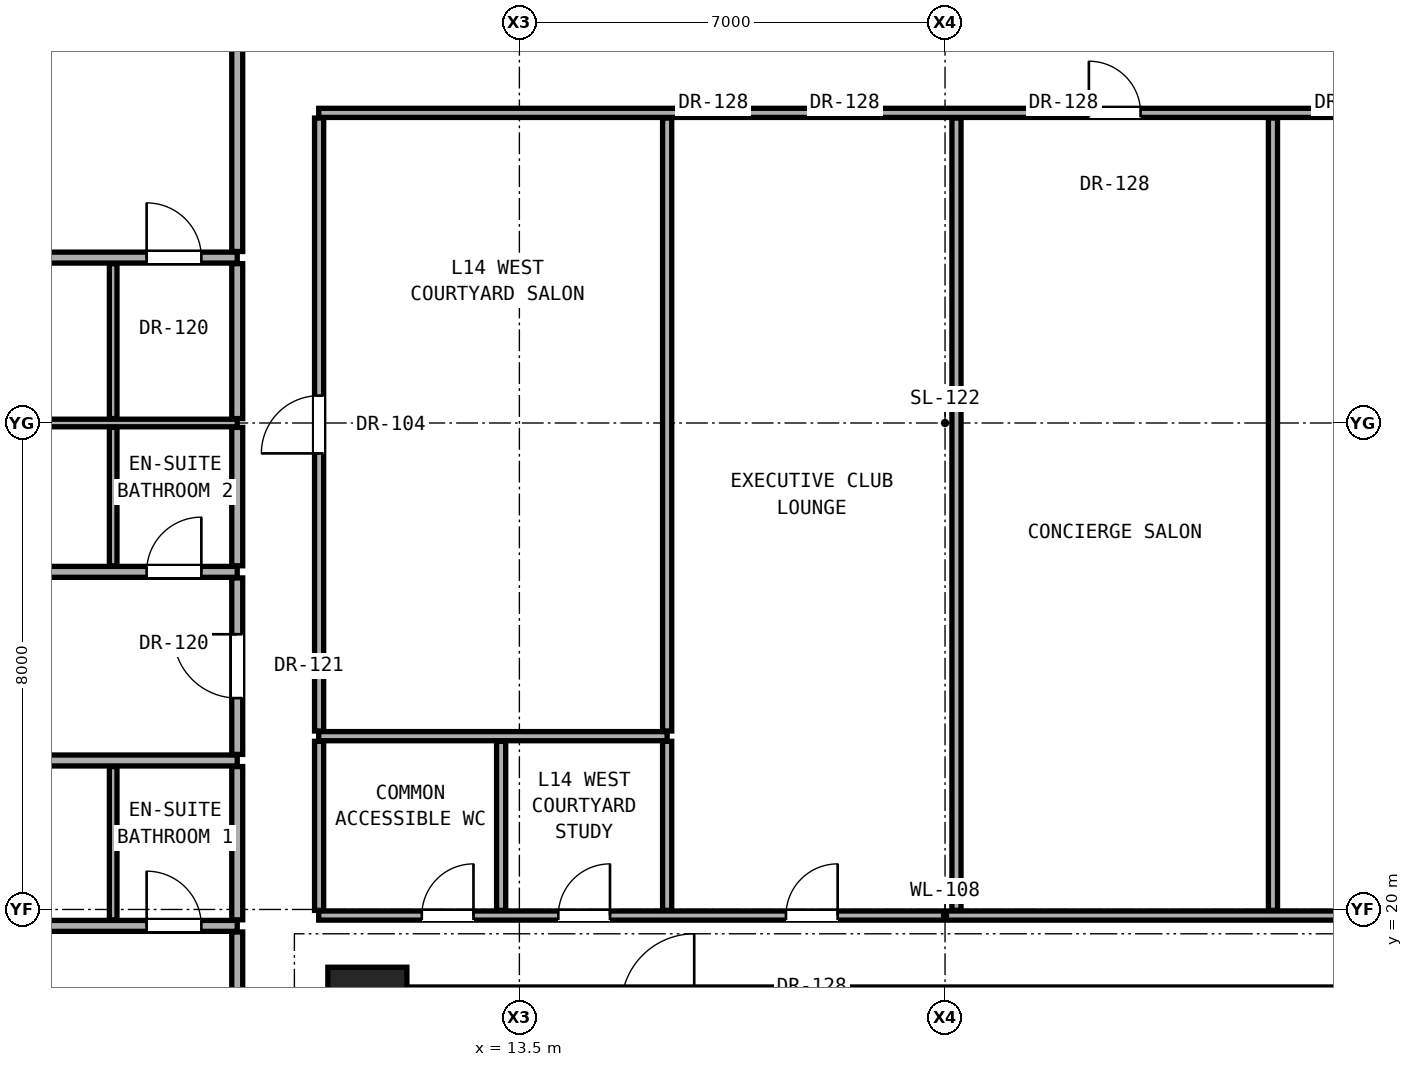
"""IFC4 building model, lengths in metres.
Left out: names, types, materials, properties, quantities, classifications, styles, units other than length and angle.
Written with IfcOpenShell. Run it as: python <this file> out.ifc"""

import sys

from ifc_helpers import new_model, si_unit, direction, frame, frame_2d, origin, origin_2d, place, context, subcontext, project, spatial, rectangle, extrude, element, fill, save


model = new_model("IFC4")
c1 = context("Model", 3, precision=1e-05, world=origin(), true_north=direction((0.0, 1.0)))
c2 = subcontext(c1, "Body", "Model", "MODEL_VIEW")
j1 = project(units=[si_unit("LENGTHUNIT", "METRE"), si_unit("PLANEANGLEUNIT", "RADIAN")], contexts=[c1])
p1 = place(None, origin())
s1 = spatial("IfcSite", under=j1, at=p1, CompositionType="ELEMENT")
p2 = place(p1, origin())
s2 = spatial("IfcBuilding", under=s1, at=p2, CompositionType="ELEMENT")
p3 = place(p2, frame((0.0, 0.0, 52.1)))
s3 = spatial("IfcBuildingStorey", under=s2, at=p3, CompositionType="ELEMENT", Elevation=52.1)
p4 = place(p3, frame((11.0, 18.4, 0.0), z_axis=(0.0, 0.0, 1.0), x_axis=(1.0, 0.0, 0.0)))
e1 = element("IfcColumn", 1, at=p4, inside=s3, PredefinedType="COLUMN", context=c2, shape_type="SweptSolid", body=[
    extrude(rectangle(XDim=1.3, YDim=1.3, at=origin_2d()), origin(), (0.0, 0.0, 1.0), 3.3),
])
p5 = place(p3, frame((-0.08, 19.73, 0.0), z_axis=(0.0, 0.0, 1.0), x_axis=(1.0, 0.0, 0.0)))
e2 = element("IfcWall", 2, at=p5, inside=s3, PredefinedType="PARTITIONING", context=c2, shape_type="SweptSolid", body=[
    extrude(rectangle(XDim=8.94, YDim=0.18, at=frame_2d((4.47, 0.0))), origin(), (0.0, 0.0, 1.0), 2.125),
])
p6 = place(p5, frame((3.045, 0.0, 0.0)))
e3 = element("IfcOpeningElement", 3, at=p6, cuts=e2, PredefinedType="OPENING", context=c2, shape_type="SweptSolid", body=[
    extrude(rectangle(XDim=0.85, YDim=2.01, at=frame_2d((0.425, 1.005))), frame((0.0, 0.1, 0.0), z_axis=(0.0, -1.0, 0.0), x_axis=(1.0, 0.0, 0.0)), (0.0, 0.0, 1.0), 0.2),
])
p7 = place(p5, frame((7.45, 0.0, 0.0)))
e4 = element("IfcOpeningElement", 4, at=p7, cuts=e2, PredefinedType="OPENING", context=c2, shape_type="SweptSolid", body=[
    extrude(rectangle(XDim=0.9, YDim=2.1, at=frame_2d((0.45, 1.05))), frame((0.0, 0.1, 0.0), z_axis=(0.0, -1.0, 0.0), x_axis=(1.0, 0.0, 0.0)), (0.0, 0.0, 1.0), 0.2),
])
p8 = place(p3, frame((10.2, 19.9, 0.0), z_axis=(0.0, 0.0, 1.0), x_axis=(1.0, 0.0, 0.0)))
e5 = element("IfcWall", 5, at=p8, inside=s3, PredefinedType="PARTITIONING", context=c2, shape_type="SweptSolid", body=[
    extrude(rectangle(XDim=20.6, YDim=0.15, at=frame_2d((10.3, 0.0))), origin(), (0.0, 0.0, 1.0), 2.104),
])
p9 = place(p8, frame((1.695, 0.0, 0.0)))
e6 = element("IfcOpeningElement", 6, at=p9, cuts=e5, PredefinedType="OPENING", context=c2, shape_type="SweptSolid", body=[
    extrude(rectangle(XDim=0.85, YDim=2.01, at=frame_2d((0.425, 1.005))), frame((0.0, 0.085, 0.0), z_axis=(0.0, -1.0, 0.0), x_axis=(1.0, 0.0, 0.0)), (0.0, 0.0, 1.0), 0.17),
])
p10 = place(p8, frame((3.94, 0.0, 0.0)))
e7 = element("IfcOpeningElement", 7, at=p10, cuts=e5, PredefinedType="OPENING", context=c2, shape_type="SweptSolid", body=[
    extrude(rectangle(XDim=0.85, YDim=2.01, at=frame_2d((0.425, 1.005))), frame((0.0, 0.085, 0.0), z_axis=(0.0, -1.0, 0.0), x_axis=(1.0, 0.0, 0.0)), (0.0, 0.0, 1.0), 0.17),
])
p11 = place(p8, frame((7.684, 0.0, 0.0)))
e8 = element("IfcOpeningElement", 8, at=p11, cuts=e5, PredefinedType="OPENING", context=c2, shape_type="SweptSolid", body=[
    extrude(rectangle(XDim=0.85, YDim=2.01, at=frame_2d((0.425, 1.005))), frame((0.0, 0.085, 0.0), z_axis=(0.0, -1.0, 0.0), x_axis=(1.0, 0.0, 0.0)), (0.0, 0.0, 1.0), 0.17),
])
p12 = place(p3, frame((-0.08, 22.45, 0.0), z_axis=(0.0, 0.0, 1.0), x_axis=(1.0, 0.0, 0.0)))
e9 = element("IfcWall", 9, at=p12, inside=s3, PredefinedType="PARTITIONING", context=c2, shape_type="SweptSolid", body=[
    extrude(rectangle(XDim=8.94, YDim=0.18, at=frame_2d((4.47, 0.0))), origin(), (0.0, 0.0, 1.0), 2.125),
])
p13 = place(p3, frame((10.2, 22.85, 0.0), z_axis=(0.0, 0.0, 1.0), x_axis=(1.0, 0.0, 0.0)))
e10 = element("IfcWall", 10, at=p13, inside=s3, PredefinedType="PARTITIONING", context=c2, shape_type="SweptSolid", body=[
    extrude(rectangle(XDim=5.73, YDim=0.15, at=frame_2d((2.865, 0.0))), origin(), (0.0, 0.0, 1.0), 2.104),
])
p14 = place(p3, frame((-0.08, 25.552, 0.0), z_axis=(0.0, 0.0, 1.0), x_axis=(1.0, 0.0, 0.0)))
e11 = element("IfcWall", 11, at=p14, inside=s3, PredefinedType="PARTITIONING", context=c2, shape_type="SweptSolid", body=[
    extrude(rectangle(XDim=8.94, YDim=0.18, at=frame_2d((4.47, 0.0))), origin(), (0.0, 0.0, 1.0), 2.125),
])
p15 = place(p14, frame((3.045, 0.0, 0.0)))
e12 = element("IfcOpeningElement", 12, at=p15, cuts=e11, PredefinedType="OPENING", context=c2, shape_type="SweptSolid", body=[
    extrude(rectangle(XDim=0.85, YDim=2.01, at=frame_2d((0.425, 1.005))), frame((0.0, 0.1, 0.0), z_axis=(0.0, -1.0, 0.0), x_axis=(1.0, 0.0, 0.0)), (0.0, 0.0, 1.0), 0.2),
])
p16 = place(p14, frame((7.45, 0.0, 0.0)))
e13 = element("IfcOpeningElement", 13, at=p16, cuts=e11, PredefinedType="OPENING", context=c2, shape_type="SweptSolid", body=[
    extrude(rectangle(XDim=0.9, YDim=2.1, at=frame_2d((0.45, 1.05))), frame((0.0, 0.1, 0.0), z_axis=(0.0, -1.0, 0.0), x_axis=(1.0, 0.0, 0.0)), (0.0, 0.0, 1.0), 0.2),
])
p17 = place(p3, frame((-0.08, 28.0, 0.0), z_axis=(0.0, 0.0, 1.0), x_axis=(1.0, 0.0, 0.0)))
e14 = element("IfcWall", 14, at=p17, inside=s3, PredefinedType="PARTITIONING", context=c2, shape_type="SweptSolid", body=[
    extrude(rectangle(XDim=8.94, YDim=0.125, at=frame_2d((4.47, 0.0))), origin(), (0.0, 0.0, 1.0), 2.125),
])
p18 = place(p3, frame((-0.08, 30.72, 0.0), z_axis=(0.0, 0.0, 1.0), x_axis=(1.0, 0.0, 0.0)))
e15 = element("IfcWall", 15, at=p18, inside=s3, PredefinedType="PARTITIONING", context=c2, shape_type="SweptSolid", body=[
    extrude(rectangle(XDim=8.94, YDim=0.18, at=frame_2d((4.47, 0.0))), origin(), (0.0, 0.0, 1.0), 2.125),
])
p19 = place(p18, frame((3.045, 0.0, 0.0)))
e16 = element("IfcOpeningElement", 16, at=p19, cuts=e15, PredefinedType="OPENING", context=c2, shape_type="SweptSolid", body=[
    extrude(rectangle(XDim=0.85, YDim=2.01, at=frame_2d((0.425, 1.005))), frame((0.0, 0.1, 0.0), z_axis=(0.0, -1.0, 0.0), x_axis=(1.0, 0.0, 0.0)), (0.0, 0.0, 1.0), 0.2),
])
p20 = place(p18, frame((7.45, 0.0, 0.0)))
e17 = element("IfcOpeningElement", 17, at=p20, cuts=e15, PredefinedType="OPENING", context=c2, shape_type="SweptSolid", body=[
    extrude(rectangle(XDim=0.9, YDim=2.1, at=frame_2d((0.45, 1.05))), frame((0.0, 0.1, 0.0), z_axis=(0.0, -1.0, 0.0), x_axis=(1.0, 0.0, 0.0)), (0.0, 0.0, 1.0), 0.2),
])
p21 = place(p3, frame((10.2, 33.1, 0.0), z_axis=(0.0, 0.0, 1.0), x_axis=(1.0, 0.0, 0.0)))
e18 = element("IfcWall", 18, at=p21, inside=s3, PredefinedType="PARTITIONING", context=c2, shape_type="SweptSolid", body=[
    extrude(rectangle(XDim=20.6, YDim=0.15, at=frame_2d((10.3, 0.0))), origin(), (0.0, 0.0, 1.0), 2.104),
])
p22 = place(p21, frame((12.666, 0.0, 0.0)))
e19 = element("IfcOpeningElement", 19, at=p22, cuts=e18, PredefinedType="OPENING", context=c2, shape_type="SweptSolid", body=[
    extrude(rectangle(XDim=0.85, YDim=2.01, at=frame_2d((0.425, 1.005))), frame((0.0, 0.085, 0.0), z_axis=(0.0, -1.0, 0.0), x_axis=(1.0, 0.0, 0.0)), (0.0, 0.0, 1.0), 0.17),
])
p23 = place(p21, frame((17.701, 0.0, 0.0)))
e20 = element("IfcOpeningElement", 20, at=p23, cuts=e18, PredefinedType="OPENING", context=c2, shape_type="SweptSolid", body=[
    extrude(rectangle(XDim=0.85, YDim=2.01, at=frame_2d((0.425, 1.005))), frame((0.0, 0.085, 0.0), z_axis=(0.0, -1.0, 0.0), x_axis=(1.0, 0.0, 0.0)), (0.0, 0.0, 1.0), 0.17),
])
p24 = place(p3, frame((6.82, 19.83, 0.0), z_axis=(0.0, 0.0, 1.0), x_axis=(0.0, 1.0, 0.0)))
e21 = element("IfcWall", 21, at=p24, inside=s3, PredefinedType="PARTITIONING", context=c2, shape_type="SweptSolid", body=[
    extrude(rectangle(XDim=2.52, YDim=0.125, at=frame_2d((1.26, 0.0))), origin(), (0.0, 0.0, 1.0), 3.06),
])
p25 = place(p3, frame((6.82, 25.652, 0.0), z_axis=(0.0, 0.0, 1.0), x_axis=(0.0, 1.0, 0.0)))
e22 = element("IfcWall", 22, at=p25, inside=s3, PredefinedType="PARTITIONING", context=c2, shape_type="SweptSolid", body=[
    extrude(rectangle(XDim=2.275, YDim=0.125, at=frame_2d((1.138, 0.0))), origin(), (0.0, 0.0, 1.0), 3.06),
])
p26 = place(p3, frame((6.82, 28.073, 0.0), z_axis=(0.0, 0.0, 1.0), x_axis=(0.0, 1.0, 0.0)))
e23 = element("IfcWall", 23, at=p26, inside=s3, PredefinedType="PARTITIONING", context=c2, shape_type="SweptSolid", body=[
    extrude(rectangle(XDim=2.548, YDim=0.125, at=frame_2d((1.274, 0.0))), origin(), (0.0, 0.0, 1.0), 3.06),
])
p27 = place(p3, frame((8.86, 14.7, 0.0), z_axis=(0.0, 0.0, 1.0), x_axis=(0.0, 1.0, 0.0)))
e24 = element("IfcWall", 24, at=p27, inside=s3, PredefinedType="PARTITIONING", context=c2, shape_type="SweptSolid", body=[
    extrude(rectangle(XDim=4.93, YDim=0.18, at=frame_2d((2.465, 0.0))), origin(), (0.0, 0.0, 1.0), 2.436),
])
p28 = place(p27, frame((2.24, 0.0, 0.0)))
e25 = element("IfcOpeningElement", 25, at=p28, cuts=e24, PredefinedType="OPENING", context=c2, shape_type="SweptSolid", body=[
    extrude(rectangle(XDim=1.05, YDim=2.2, at=frame_2d((0.525, 1.1))), frame((0.0, 0.1, 0.0), z_axis=(0.0, -1.0, 0.0), x_axis=(1.0, 0.0, 0.0)), (0.0, 0.0, 1.0), 0.2),
])
p29 = place(p3, frame((8.86, 19.83, 0.0), z_axis=(0.0, 0.0, 1.0), x_axis=(0.0, 1.0, 0.0)))
e26 = element("IfcWall", 26, at=p29, inside=s3, PredefinedType="PARTITIONING", context=c2, shape_type="SweptSolid", body=[
    extrude(rectangle(XDim=2.52, YDim=0.18, at=frame_2d((1.26, 0.0))), origin(), (0.0, 0.0, 1.0), 3.06),
])
p30 = place(p3, frame((8.86, 22.55, 0.0), z_axis=(0.0, 0.0, 1.0), x_axis=(0.0, 1.0, 0.0)))
e27 = element("IfcWall", 27, at=p30, inside=s3, PredefinedType="PARTITIONING", context=c2, shape_type="SweptSolid", body=[
    extrude(rectangle(XDim=2.902, YDim=0.18, at=frame_2d((1.451, 0.0))), origin(), (0.0, 0.0, 1.0), 2.279),
])
p31 = place(p30, frame((0.926, 0.0, 0.0)))
e28 = element("IfcOpeningElement", 28, at=p31, cuts=e27, PredefinedType="OPENING", context=c2, shape_type="SweptSolid", body=[
    extrude(rectangle(XDim=1.05, YDim=2.2, at=frame_2d((0.525, 1.1))), frame((0.0, 0.1, 0.0), z_axis=(0.0, -1.0, 0.0), x_axis=(1.0, 0.0, 0.0)), (0.0, 0.0, 1.0), 0.2),
])
p32 = place(p3, frame((8.86, 25.652, 0.0), z_axis=(0.0, 0.0, 1.0), x_axis=(0.0, 1.0, 0.0)))
e29 = element("IfcWall", 29, at=p32, inside=s3, PredefinedType="PARTITIONING", context=c2, shape_type="SweptSolid", body=[
    extrude(rectangle(XDim=2.275, YDim=0.18, at=frame_2d((1.138, 0.0))), origin(), (0.0, 0.0, 1.0), 3.06),
])
p33 = place(p3, frame((8.86, 28.073, 0.0), z_axis=(0.0, 0.0, 1.0), x_axis=(0.0, 1.0, 0.0)))
e30 = element("IfcWall", 30, at=p33, inside=s3, PredefinedType="PARTITIONING", context=c2, shape_type="SweptSolid", body=[
    extrude(rectangle(XDim=2.548, YDim=0.18, at=frame_2d((1.274, 0.0))), origin(), (0.0, 0.0, 1.0), 3.06),
])
p34 = place(p3, frame((8.86, 30.82, 0.0), z_axis=(0.0, 0.0, 1.0), x_axis=(0.0, 1.0, 0.0)))
e31 = element("IfcWall", 31, at=p34, inside=s3, PredefinedType="PARTITIONING", context=c2, shape_type="SweptSolid", body=[
    extrude(rectangle(XDim=10.48, YDim=0.18, at=frame_2d((5.24, 0.0))), origin(), (0.0, 0.0, 1.0), 2.279),
])
p35 = place(p34, frame((4.715, 0.0, 0.0)))
e32 = element("IfcOpeningElement", 32, at=p35, cuts=e31, PredefinedType="OPENING", context=c2, shape_type="SweptSolid", body=[
    extrude(rectangle(XDim=1.05, YDim=2.2, at=frame_2d((0.525, 1.1))), frame((0.0, 0.1, 0.0), z_axis=(0.0, -1.0, 0.0), x_axis=(1.0, 0.0, 0.0)), (0.0, 0.0, 1.0), 0.2),
])
p36 = place(p3, frame((10.207, 19.985, 0.0), z_axis=(0.0, 0.0, 1.0), x_axis=(0.0, 1.0, 0.0)))
e33 = element("IfcWall", 33, at=p36, inside=s3, PredefinedType="PARTITIONING", context=c2, shape_type="SweptSolid", body=[
    extrude(rectangle(XDim=2.78, YDim=0.15, at=frame_2d((1.39, 0.0))), origin(), (0.0, 0.0, 1.0), 3.06),
])
p37 = place(p3, frame((10.207, 22.935, 0.0), z_axis=(0.0, 0.0, 1.0), x_axis=(0.0, 1.0, 0.0)))
e34 = element("IfcWall", 34, at=p37, inside=s3, PredefinedType="PARTITIONING", context=c2, shape_type="SweptSolid", body=[
    extrude(rectangle(XDim=10.08, YDim=0.15, at=frame_2d((5.04, 0.0))), origin(), (0.0, 0.0, 1.0), 2.279),
])
p38 = place(p37, frame((4.565, 0.0, 0.0)))
e35 = element("IfcOpeningElement", 35, at=p38, cuts=e34, PredefinedType="OPENING", context=c2, shape_type="SweptSolid", body=[
    extrude(rectangle(XDim=0.95, YDim=2.15, at=frame_2d((0.475, 1.075))), frame((0.0, 0.085, 0.0), z_axis=(0.0, -1.0, 0.0), x_axis=(1.0, 0.0, 0.0)), (0.0, 0.0, 1.0), 0.17),
])
p39 = place(p3, frame((13.2, 19.985, 0.0), z_axis=(0.0, 0.0, 1.0), x_axis=(0.0, 1.0, 0.0)))
e36 = element("IfcWall", 36, at=p39, inside=s3, PredefinedType="PARTITIONING", context=c2, shape_type="SweptSolid", body=[
    extrude(rectangle(XDim=2.78, YDim=0.15, at=frame_2d((1.39, 0.0))), origin(), (0.0, 0.0, 1.0), 3.06),
])
p40 = place(p3, frame((15.93, 19.985, 0.0), z_axis=(0.0, 0.0, 1.0), x_axis=(0.0, 1.0, 0.0)))
e37 = element("IfcWall", 37, at=p40, inside=s3, PredefinedType="PARTITIONING", context=c2, shape_type="SweptSolid", body=[
    extrude(rectangle(XDim=2.78, YDim=0.15, at=frame_2d((1.39, 0.0))), origin(), (0.0, 0.0, 1.0), 2.589),
])
p41 = place(p3, frame((15.93, 22.935, 0.0), z_axis=(0.0, 0.0, 1.0), x_axis=(0.0, 1.0, 0.0)))
e38 = element("IfcWall", 38, at=p41, inside=s3, PredefinedType="PARTITIONING", context=c2, shape_type="SweptSolid", body=[
    extrude(rectangle(XDim=10.08, YDim=0.15, at=frame_2d((5.04, 0.0))), origin(), (0.0, 0.0, 1.0), 2.104),
])
for number, where, z_axis, x_axis in (
    (39, (20.688, 19.985, 0.0), (0.0, 0.0, 1.0), (0.0, 1.0, 0.0)),
    (40, (25.893, 19.985, 0.0), (0.0, 0.0, 1.0), (0.0, 1.0, 0.0)),
):
    element("IfcWall", number, at=place(p3, frame(where, z_axis=z_axis, x_axis=x_axis)), inside=s3, PredefinedType="PARTITIONING", context=c2, shape_type="SweptSolid", body=[
        extrude(rectangle(XDim=13.03, YDim=0.15, at=frame_2d((6.515, 0.0))), origin(), (0.0, 0.0, 1.0), 2.104),
    ])
p42 = place(p9, origin())
e41 = element("IfcDoor", 41, at=p42, inside=s3, OperationType="SINGLE_SWING_RIGHT", PredefinedType="DOOR", context=c2, shape_type="SweptSolid", body=[
    extrude(rectangle(XDim=0.85, YDim=2.01, at=frame_2d((0.425, 1.005))), frame((0.0, 0.025, 0.0), z_axis=(0.0, -1.0, 0.0), x_axis=(1.0, 0.0, 0.0)), (0.0, 0.0, 1.0), 0.05),
])
fill(e6, e41)
p43 = place(p7, origin())
e42 = element("IfcDoor", 42, at=p43, inside=s3, OperationType="SINGLE_SWING_LEFT", PredefinedType="DOOR", context=c2, shape_type="SweptSolid", body=[
    extrude(rectangle(XDim=0.9, YDim=2.1, at=frame_2d((0.45, 1.05))), frame((0.0, 0.025, 0.0), z_axis=(0.0, -1.0, 0.0), x_axis=(1.0, 0.0, 0.0)), (0.0, 0.0, 1.0), 0.05),
])
fill(e4, e42)
p44 = place(p31, origin())
e43 = element("IfcDoor", 43, at=p44, inside=s3, OperationType="SINGLE_SWING_RIGHT", PredefinedType="DOOR", context=c2, shape_type="SweptSolid", body=[
    extrude(rectangle(XDim=1.05, YDim=2.2, at=frame_2d((0.525, 1.1))), frame((0.0, 0.025, 0.0), z_axis=(0.0, -1.0, 0.0), x_axis=(1.0, 0.0, 0.0)), (0.0, 0.0, 1.0), 0.05),
])
fill(e28, e43)
p45 = place(p16, origin())
e44 = element("IfcDoor", 44, at=p45, inside=s3, OperationType="SINGLE_SWING_RIGHT", PredefinedType="DOOR", context=c2, shape_type="SweptSolid", body=[
    extrude(rectangle(XDim=0.9, YDim=2.1, at=frame_2d((0.45, 1.05))), frame((0.0, 0.025, 0.0), z_axis=(0.0, -1.0, 0.0), x_axis=(1.0, 0.0, 0.0)), (0.0, 0.0, 1.0), 0.05),
])
fill(e13, e44)
p46 = place(p20, origin())
e45 = element("IfcDoor", 45, at=p46, inside=s3, OperationType="SINGLE_SWING_LEFT", PredefinedType="DOOR", context=c2, shape_type="SweptSolid", body=[
    extrude(rectangle(XDim=0.9, YDim=2.1, at=frame_2d((0.45, 1.05))), frame((0.0, 0.025, 0.0), z_axis=(0.0, -1.0, 0.0), x_axis=(1.0, 0.0, 0.0)), (0.0, 0.0, 1.0), 0.05),
])
fill(e17, e45)
p47 = place(p10, origin())
e46 = element("IfcDoor", 46, at=p47, inside=s3, OperationType="SINGLE_SWING_RIGHT", PredefinedType="DOOR", context=c2, shape_type="SweptSolid", body=[
    extrude(rectangle(XDim=0.85, YDim=2.01, at=frame_2d((0.425, 1.005))), frame((0.0, 0.025, 0.0), z_axis=(0.0, -1.0, 0.0), x_axis=(1.0, 0.0, 0.0)), (0.0, 0.0, 1.0), 0.05),
])
fill(e7, e46)
p48 = place(p38, origin())
e47 = element("IfcDoor", 47, at=p48, inside=s3, OperationType="SINGLE_SWING_LEFT", PredefinedType="DOOR", context=c2, shape_type="SweptSolid", body=[
    extrude(rectangle(XDim=0.95, YDim=2.15, at=frame_2d((0.475, 1.075))), frame((0.0, 0.025, 0.0), z_axis=(0.0, -1.0, 0.0), x_axis=(1.0, 0.0, 0.0)), (0.0, 0.0, 1.0), 0.05),
])
fill(e35, e47)
p49 = place(p11, origin())
e48 = element("IfcDoor", 48, at=p49, inside=s3, OperationType="SINGLE_SWING_RIGHT", PredefinedType="DOOR", context=c2, shape_type="SweptSolid", body=[
    extrude(rectangle(XDim=0.85, YDim=2.01, at=frame_2d((0.425, 1.005))), frame((0.0, 0.025, 0.0), z_axis=(0.0, -1.0, 0.0), x_axis=(1.0, 0.0, 0.0)), (0.0, 0.0, 1.0), 0.05),
])
fill(e8, e48)
p50 = place(p22, origin())
e49 = element("IfcDoor", 49, at=p50, inside=s3, OperationType="SINGLE_SWING_LEFT", PredefinedType="DOOR", context=c2, shape_type="SweptSolid", body=[
    extrude(rectangle(XDim=0.85, YDim=2.01, at=frame_2d((0.425, 1.005))), frame((0.0, 0.025, 0.0), z_axis=(0.0, -1.0, 0.0), x_axis=(1.0, 0.0, 0.0)), (0.0, 0.0, 1.0), 0.05),
])
fill(e19, e49)
save(model, sys.argv[1])
